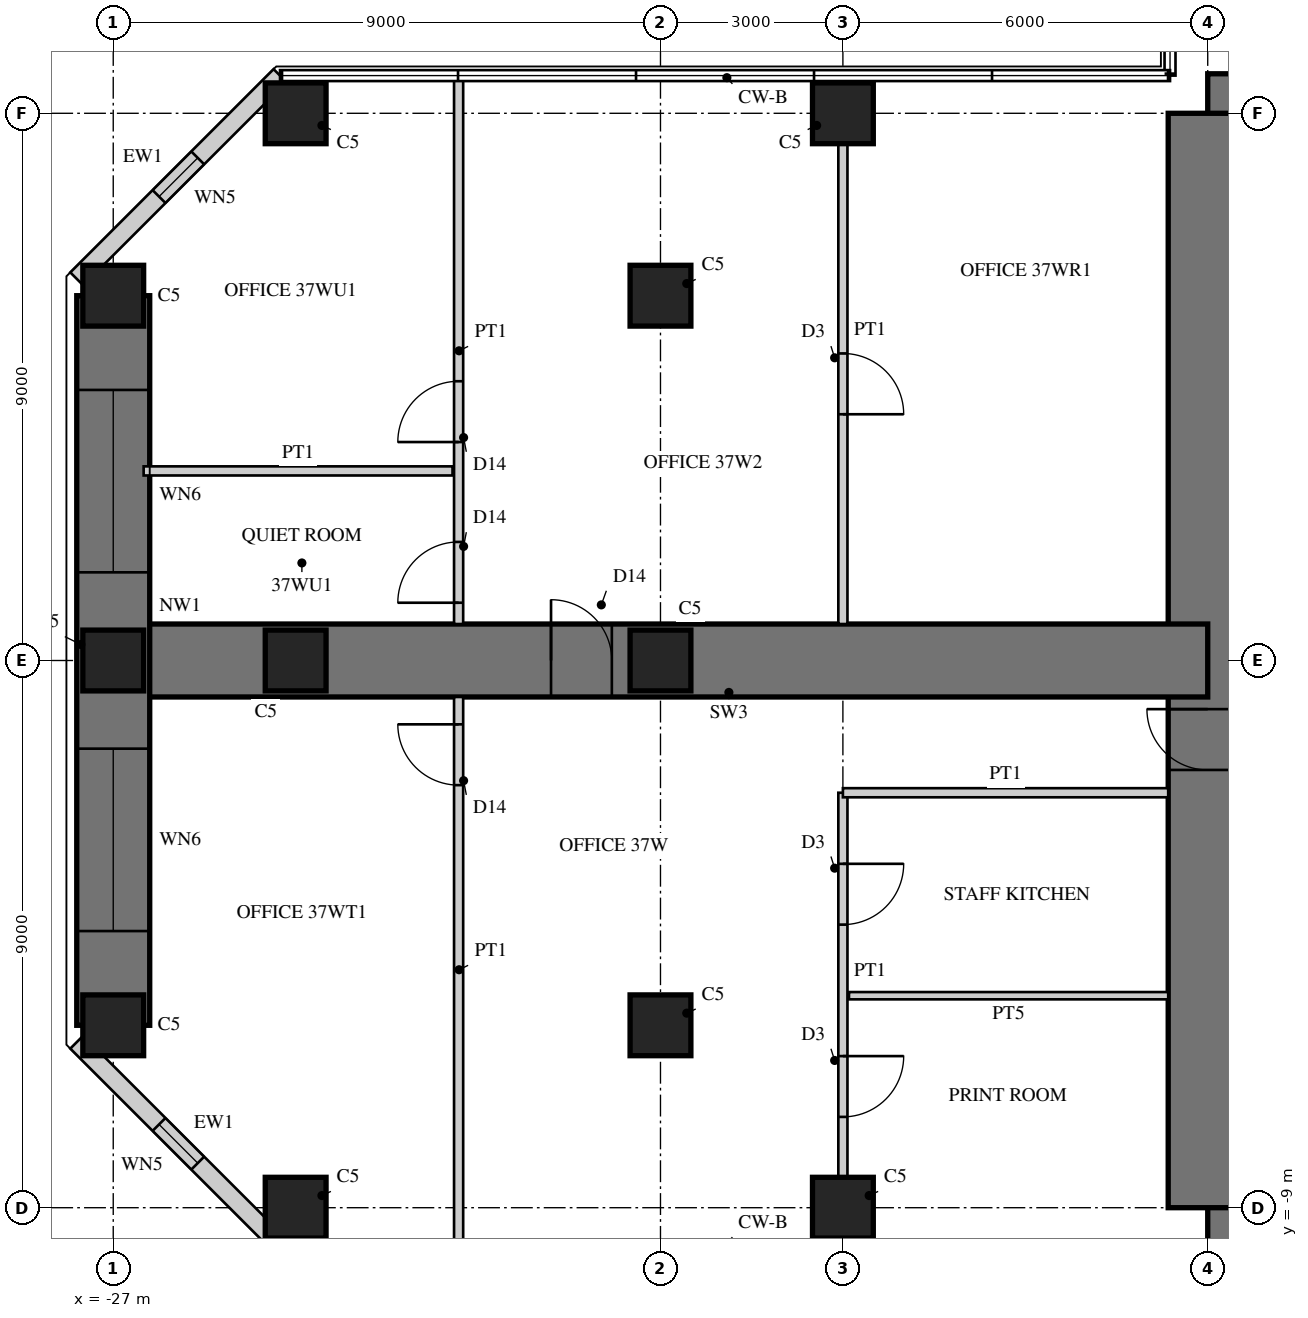
"""IFC4 building model, lengths in metres.
Left out: names, types, materials, properties, quantities, classifications, styles, units other than length and angle.
Written with IfcOpenShell. Run it as: python <this file> out.ifc"""

import sys

from ifc_helpers import new_model, si_unit, direction, frame, frame_2d, origin, origin_2d, place, context, subcontext, project, spatial, rectangle, hollow_rectangle, extrude, element, fill, save


model = new_model("IFC4")
c1 = context("Model", 3, precision=1e-05, world=origin(), true_north=direction((0.0, 1.0)))
c2 = subcontext(c1, "Body", "Model", "MODEL_VIEW")
j1 = project(units=[si_unit("LENGTHUNIT", "METRE"), si_unit("PLANEANGLEUNIT", "RADIAN")], contexts=[c1])
p1 = place(None, origin())
s1 = spatial("IfcSite", under=j1, at=p1, CompositionType="ELEMENT")
p2 = place(p1, origin())
s2 = spatial("IfcBuilding", under=s1, at=p2, CompositionType="ELEMENT")
p3 = place(p2, frame((0.0, 0.0, 152.5)))
s3 = spatial("IfcBuildingStorey", under=s2, at=p3, CompositionType="ELEMENT", Elevation=152.5)
p4 = place(p3, frame((9.0, 9.0, 0.0), z_axis=(0.0, 0.0, 1.0), x_axis=(-1.0, 0.0, 0.0)))
e1 = element("IfcWall", 1, at=p4, inside=s3, PredefinedType="SHEAR", context=c2, shape_type="SweptSolid", body=[
    extrude(rectangle(XDim=18.0, YDim=1.3, at=frame_2d((9.0, 0.0))), origin(), (0.0, 0.0, 1.0), 4.0),
])
p5 = place(p4, frame((9.8, 0.0, 0.0)))
e2 = element("IfcOpeningElement", 2, at=p5, cuts=e1, PredefinedType="OPENING", context=c2, shape_type="SweptSolid", body=[
    extrude(rectangle(XDim=1.0, YDim=2.4, at=frame_2d((0.5, 1.2))), frame((0.0, 0.66, 0.0), z_axis=(0.0, -1.0, 0.0), x_axis=(1.0, 0.0, 0.0)), (0.0, 0.0, 1.0), 1.32),
])
p6 = place(p3, frame((-9.0, -9.0, 0.0), z_axis=(0.0, 0.0, 1.0), x_axis=(1.0, 0.0, 0.0)))
e3 = element("IfcWall", 3, at=p6, inside=s3, PredefinedType="SHEAR", context=c2, shape_type="SweptSolid", body=[
    extrude(rectangle(XDim=18.0, YDim=1.3, at=frame_2d((9.0, 0.0))), origin(), (0.0, 0.0, 1.0), 4.0),
])
p7 = place(p6, frame((9.8, 0.0, 0.0)))
e4 = element("IfcOpeningElement", 4, at=p7, cuts=e3, PredefinedType="OPENING", context=c2, shape_type="SweptSolid", body=[
    extrude(rectangle(XDim=1.0, YDim=2.4, at=frame_2d((0.5, 1.2))), frame((0.0, 0.66, 0.0), z_axis=(0.0, -1.0, 0.0), x_axis=(1.0, 0.0, 0.0)), (0.0, 0.0, 1.0), 1.32),
])
p8 = place(p3, frame((-9.0, 9.0, 0.0), z_axis=(0.0, 0.0, 1.0), x_axis=(0.0, -1.0, 0.0)))
e5 = element("IfcWall", 5, at=p8, inside=s3, PredefinedType="SHEAR", context=c2, shape_type="SweptSolid", body=[
    extrude(rectangle(XDim=18.0, YDim=1.3, at=frame_2d((9.0, 0.0))), origin(), (0.0, 0.0, 1.0), 4.0),
])
p9 = place(p8, frame((9.8, 0.0, 0.0)))
e6 = element("IfcOpeningElement", 6, at=p9, cuts=e5, PredefinedType="OPENING", context=c2, shape_type="SweptSolid", body=[
    extrude(rectangle(XDim=1.0, YDim=2.4, at=frame_2d((0.5, 1.2))), frame((0.0, 0.66, 0.0), z_axis=(0.0, -1.0, 0.0), x_axis=(1.0, 0.0, 0.0)), (0.0, 0.0, 1.0), 1.32),
])
p10 = place(p3, frame((-9.0, 0.0, 0.0), z_axis=(0.0, 0.0, 1.0), x_axis=(-1.0, 0.0, 0.0)))
e7 = element("IfcWall", 7, at=p10, inside=s3, PredefinedType="SHEAR", context=c2, shape_type="SweptSolid", body=[
    extrude(rectangle(XDim=18.0, YDim=1.2, at=frame_2d((9.0, 0.0))), origin(), (0.0, 0.0, 1.0), 4.0),
])
p11 = place(p10, frame((9.8, 0.0, 0.0)))
e8 = element("IfcOpeningElement", 8, at=p11, cuts=e7, PredefinedType="OPENING", context=c2, shape_type="SweptSolid", body=[
    extrude(rectangle(XDim=1.0, YDim=2.2, at=frame_2d((0.5, 1.1))), frame((0.0, 0.61, 0.0), z_axis=(0.0, -1.0, 0.0), x_axis=(1.0, 0.0, 0.0)), (0.0, 0.0, 1.0), 1.22),
])
p12 = place(p3, frame((-27.0, 6.0, 0.0), z_axis=(0.0, 0.0, 1.0), x_axis=(0.0, -1.0, 0.0)))
e9 = element("IfcWall", 9, at=p12, inside=s3, PredefinedType="SHEAR", context=c2, shape_type="SweptSolid", body=[
    extrude(rectangle(XDim=12.0, YDim=1.2, at=frame_2d((6.0, 0.0))), origin(), (0.0, 0.0, 1.0), 4.0),
])
p13 = place(p12, frame((1.55, 0.0, 0.6)))
e10 = element("IfcOpeningElement", 10, at=p13, cuts=e9, PredefinedType="OPENING", context=c2, shape_type="SweptSolid", body=[
    extrude(rectangle(XDim=3.0, YDim=2.4, at=frame_2d((1.5, 1.2))), frame((0.0, 0.61, 0.0), z_axis=(0.0, -1.0, 0.0), x_axis=(1.0, 0.0, 0.0)), (0.0, 0.0, 1.0), 1.22),
])
p14 = place(p12, frame((7.45, 0.0, 0.6)))
e11 = element("IfcOpeningElement", 11, at=p14, cuts=e9, PredefinedType="OPENING", context=c2, shape_type="SweptSolid", body=[
    extrude(rectangle(XDim=3.0, YDim=2.4, at=frame_2d((1.5, 1.2))), frame((0.0, 0.61, 0.0), z_axis=(0.0, -1.0, 0.0), x_axis=(1.0, 0.0, 0.0)), (0.0, 0.0, 1.0), 1.22),
])
for number, where, z_axis, x_axis in (
    (12, (-15.0, 9.0, 0.0), (0.0, 0.0, 1.0), (1.0, 0.0, 0.0)),
    (13, (-24.0, 9.0, 0.0), (0.0, 0.0, 1.0), (1.0, 0.0, 0.0)),
    (14, (-15.0, -9.0, 0.0), (0.0, 0.0, 1.0), (1.0, 0.0, 0.0)),
    (15, (-24.0, -9.0, 0.0), (0.0, 0.0, 1.0), (1.0, 0.0, 0.0)),
    (16, (-27.0, 6.0, 0.0), (0.0, 0.0, 1.0), (1.0, 0.0, 0.0)),
    (17, (-27.0, 0.0, 0.0), (0.0, 0.0, 1.0), (1.0, 0.0, 0.0)),
    (18, (-27.0, -6.0, 0.0), (0.0, 0.0, 1.0), (1.0, 0.0, 0.0)),
    (19, (-18.0, 6.0, 0.0), (0.0, 0.0, 1.0), (1.0, 0.0, 0.0)),
    (20, (-18.0, 0.0, 0.0), (0.0, 0.0, 1.0), (1.0, 0.0, 0.0)),
    (21, (-18.0, -6.0, 0.0), (0.0, 0.0, 1.0), (1.0, 0.0, 0.0)),
    (22, (-24.0, 0.0, 0.0), (0.0, 0.0, 1.0), (1.0, 0.0, 0.0)),
):
    element("IfcColumn", number, at=place(p3, frame(where, z_axis=z_axis, x_axis=x_axis)), inside=s3, PredefinedType="COLUMN", context=c2, shape_type="SweptSolid", body=[
        extrude(rectangle(XDim=1.0, YDim=1.0, at=origin_2d()), origin(), (0.0, 0.0, 1.0), 4.0),
    ])
p15 = place(p3, frame((-24.257, 9.62, 0.0), z_axis=(0.0, 0.0, 1.0), x_axis=(-0.707106781187, -0.707106781187, 0.0)))
e23 = element("IfcWall", 23, at=p15, inside=s3, PredefinedType="SOLIDWALL", context=c2, shape_type="SweptSolid", body=[
    extrude(rectangle(XDim=4.728, YDim=0.3, at=frame_2d((2.364, 0.0))), origin(), (0.0, 0.0, 1.0), 3.8),
])
p16 = place(p15, frame((1.914, 0.0, 0.3)))
e24 = element("IfcOpeningElement", 24, at=p16, cuts=e23, PredefinedType="OPENING", context=c2, shape_type="SweptSolid", body=[
    extrude(rectangle(XDim=0.9, YDim=2.4, at=frame_2d((0.45, 1.2))), frame((0.0, 0.16, 0.0), z_axis=(0.0, -1.0, 0.0), x_axis=(1.0, 0.0, 0.0)), (0.0, 0.0, 1.0), 0.32),
])
p17 = place(p3, frame((-27.6, -6.277, 0.0), z_axis=(0.0, 0.0, 1.0), x_axis=(0.707106781187, -0.707106781187, 0.0)))
e25 = element("IfcWall", 25, at=p17, inside=s3, PredefinedType="SOLIDWALL", context=c2, shape_type="SweptSolid", body=[
    extrude(rectangle(XDim=4.728, YDim=0.3, at=frame_2d((2.364, 0.0))), origin(), (0.0, 0.0, 1.0), 3.8),
])
p18 = place(p17, frame((1.914, 0.0, 0.3)))
e26 = element("IfcOpeningElement", 26, at=p18, cuts=e25, PredefinedType="OPENING", context=c2, shape_type="SweptSolid", body=[
    extrude(rectangle(XDim=0.9, YDim=2.4, at=frame_2d((0.45, 1.2))), frame((0.0, 0.16, 0.0), z_axis=(0.0, -1.0, 0.0), x_axis=(1.0, 0.0, 0.0)), (0.0, 0.0, 1.0), 0.32),
])
p19 = place(p3, frame((-15.0, -2.175, 0.0), z_axis=(0.0, 0.0, 1.0), x_axis=(0.0, -1.0, 0.0)))
e27 = element("IfcWall", 27, at=p19, inside=s3, PredefinedType="PARTITIONING", context=c2, shape_type="SweptSolid", body=[
    extrude(rectangle(XDim=6.325, YDim=0.15, at=frame_2d((3.163, 0.0))), origin(), (0.0, 0.0, 1.0), 3.0),
])
p20 = place(p19, frame((1.169, 0.0, 0.0)))
e28 = element("IfcOpeningElement", 28, at=p20, cuts=e27, PredefinedType="OPENING", context=c2, shape_type="SweptSolid", body=[
    extrude(rectangle(XDim=1.0, YDim=2.1, at=frame_2d((0.5, 1.05))), frame((0.0, 0.085, 0.0), z_axis=(0.0, -1.0, 0.0), x_axis=(1.0, 0.0, 0.0)), (0.0, 0.0, 1.0), 0.17),
])
p21 = place(p19, frame((4.332, 0.0, 0.0)))
e29 = element("IfcOpeningElement", 29, at=p21, cuts=e27, PredefinedType="OPENING", context=c2, shape_type="SweptSolid", body=[
    extrude(rectangle(XDim=1.0, YDim=2.1, at=frame_2d((0.5, 1.05))), frame((0.0, 0.085, 0.0), z_axis=(0.0, -1.0, 0.0), x_axis=(1.0, 0.0, 0.0)), (0.0, 0.0, 1.0), 0.17),
])
p22 = place(p3, frame((-9.65, -2.175, 0.0), z_axis=(0.0, 0.0, 1.0), x_axis=(-1.0, 0.0, 0.0)))
e30 = element("IfcWall", 30, at=p22, inside=s3, PredefinedType="PARTITIONING", context=c2, shape_type="SweptSolid", body=[
    extrude(rectangle(XDim=5.35, YDim=0.15, at=frame_2d((2.675, 0.0))), origin(), (0.0, 0.0, 1.0), 3.8),
])
p23 = place(p3, frame((-9.65, -5.513, 0.0), z_axis=(0.0, 0.0, 1.0), x_axis=(-1.0, 0.0, 0.0)))
e31 = element("IfcWall", 31, at=p23, inside=s3, PredefinedType="PLUMBINGWALL", context=c2, shape_type="SweptSolid", body=[
    extrude(rectangle(XDim=5.25, YDim=0.12, at=frame_2d((2.625, 0.0))), origin(), (0.0, 0.0, 1.0), 3.8),
])
p24 = place(p3, frame((-15.0, 8.5, 0.0), z_axis=(0.0, 0.0, 1.0), x_axis=(0.0, -1.0, 0.0)))
e32 = element("IfcWall", 32, at=p24, inside=s3, PredefinedType="PARTITIONING", context=c2, shape_type="SweptSolid", body=[
    extrude(rectangle(XDim=7.9, YDim=0.15, at=frame_2d((3.95, 0.0))), origin(), (0.0, 0.0, 1.0), 3.0),
])
p25 = place(p24, frame((3.45, 0.0, 0.0)))
e33 = element("IfcOpeningElement", 33, at=p25, cuts=e32, PredefinedType="OPENING", context=c2, shape_type="SweptSolid", body=[
    extrude(rectangle(XDim=1.0, YDim=2.1, at=frame_2d((0.5, 1.05))), frame((0.0, 0.085, 0.0), z_axis=(0.0, -1.0, 0.0), x_axis=(1.0, 0.0, 0.0)), (0.0, 0.0, 1.0), 0.17),
])
p26 = place(p3, frame((-21.32, -0.6, 0.0), z_axis=(0.0, 0.0, 1.0), x_axis=(0.0, -1.0, 0.0)))
e34 = element("IfcWall", 34, at=p26, inside=s3, PredefinedType="PARTITIONING", context=c2, shape_type="SweptSolid", body=[
    extrude(rectangle(XDim=8.98, YDim=0.15, at=frame_2d((4.49, 0.0))), origin(), (0.0, 0.0, 1.0), 3.8),
])
p27 = place(p26, frame((0.45, 0.0, 0.0)))
e35 = element("IfcOpeningElement", 35, at=p27, cuts=e34, PredefinedType="OPENING", context=c2, shape_type="SweptSolid", body=[
    extrude(rectangle(XDim=1.0, YDim=2.2, at=frame_2d((0.5, 1.1))), frame((0.0, 0.085, 0.0), z_axis=(0.0, -1.0, 0.0), x_axis=(1.0, 0.0, 0.0)), (0.0, 0.0, 1.0), 0.17),
])
p28 = place(p3, frame((-21.42, 3.118, 0.0), z_axis=(0.0, 0.0, 1.0), x_axis=(-1.0, 0.0, 0.0)))
e36 = element("IfcWall", 36, at=p28, inside=s3, PredefinedType="PARTITIONING", context=c2, shape_type="SweptSolid", body=[
    extrude(rectangle(XDim=5.08, YDim=0.15, at=frame_2d((2.54, 0.0))), origin(), (0.0, 0.0, 1.0), 3.8),
])
p29 = place(p3, frame((-21.32, 9.58, 0.0), z_axis=(0.0, 0.0, 1.0), x_axis=(0.0, -1.0, 0.0)))
e37 = element("IfcWall", 37, at=p29, inside=s3, PredefinedType="PARTITIONING", context=c2, shape_type="SweptSolid", body=[
    extrude(rectangle(XDim=8.98, YDim=0.15, at=frame_2d((4.49, 0.0))), origin(), (0.0, 0.0, 1.0), 3.8),
])
p30 = place(p29, frame((4.987, 0.0, 0.0)))
e38 = element("IfcOpeningElement", 38, at=p30, cuts=e37, PredefinedType="OPENING", context=c2, shape_type="SweptSolid", body=[
    extrude(rectangle(XDim=1.0, YDim=2.2, at=frame_2d((0.5, 1.1))), frame((0.0, 0.085, 0.0), z_axis=(0.0, -1.0, 0.0), x_axis=(1.0, 0.0, 0.0)), (0.0, 0.0, 1.0), 0.17),
])
p31 = place(p29, frame((7.63, 0.0, 0.0)))
e39 = element("IfcOpeningElement", 39, at=p31, cuts=e37, PredefinedType="OPENING", context=c2, shape_type="SweptSolid", body=[
    extrude(rectangle(XDim=1.0, YDim=2.2, at=frame_2d((0.5, 1.1))), frame((0.0, 0.085, 0.0), z_axis=(0.0, -1.0, 0.0), x_axis=(1.0, 0.0, 0.0)), (0.0, 0.0, 1.0), 0.17),
])
p32 = place(p16, origin())
e40 = element("IfcWindow", 40, at=p32, inside=s3, PartitioningType="SINGLE_PANEL", PredefinedType="WINDOW", context=c2, shape_type="SweptSolid", body=[
    extrude(hollow_rectangle(XDim=0.9, YDim=2.4, WallThickness=0.06, at=frame_2d((0.45, 1.2))), frame((0.0, 0.03, 0.0), z_axis=(0.0, -1.0, 0.0), x_axis=(1.0, 0.0, 0.0)), (0.0, 0.0, 1.0), 0.06),
    extrude(rectangle(XDim=0.779, YDim=2.279, at=frame_2d((0.45, 1.2))), frame((0.0, 0.03, 0.0), z_axis=(0.0, -1.0, 0.0), x_axis=(1.0, 0.0, 0.0)), (0.0, 0.0, 1.0), 0.06),
])
fill(e24, e40)
p33 = place(p13, origin())
e41 = element("IfcWindow", 41, at=p33, inside=s3, PartitioningType="SINGLE_PANEL", PredefinedType="WINDOW", context=c2, shape_type="SweptSolid", body=[
    extrude(hollow_rectangle(XDim=3.0, YDim=2.4, WallThickness=0.06, at=frame_2d((1.5, 1.2))), frame((0.0, 0.03, 0.0), z_axis=(0.0, -1.0, 0.0), x_axis=(1.0, 0.0, 0.0)), (0.0, 0.0, 1.0), 0.06),
    extrude(rectangle(XDim=2.879, YDim=2.279, at=frame_2d((1.5, 1.2))), frame((0.0, 0.03, 0.0), z_axis=(0.0, -1.0, 0.0), x_axis=(1.0, 0.0, 0.0)), (0.0, 0.0, 1.0), 0.06),
])
fill(e10, e41)
p34 = place(p14, origin())
e42 = element("IfcWindow", 42, at=p34, inside=s3, PartitioningType="SINGLE_PANEL", PredefinedType="WINDOW", context=c2, shape_type="SweptSolid", body=[
    extrude(hollow_rectangle(XDim=3.0, YDim=2.4, WallThickness=0.06, at=frame_2d((1.5, 1.2))), frame((0.0, 0.03, 0.0), z_axis=(0.0, -1.0, 0.0), x_axis=(1.0, 0.0, 0.0)), (0.0, 0.0, 1.0), 0.06),
    extrude(rectangle(XDim=2.879, YDim=2.279, at=frame_2d((1.5, 1.2))), frame((0.0, 0.03, 0.0), z_axis=(0.0, -1.0, 0.0), x_axis=(1.0, 0.0, 0.0)), (0.0, 0.0, 1.0), 0.06),
])
fill(e11, e42)
p35 = place(p18, origin())
e43 = element("IfcWindow", 43, at=p35, inside=s3, PartitioningType="SINGLE_PANEL", PredefinedType="WINDOW", context=c2, shape_type="SweptSolid", body=[
    extrude(hollow_rectangle(XDim=0.9, YDim=2.4, WallThickness=0.06, at=frame_2d((0.45, 1.2))), frame((0.0, 0.03, 0.0), z_axis=(0.0, -1.0, 0.0), x_axis=(1.0, 0.0, 0.0)), (0.0, 0.0, 1.0), 0.06),
    extrude(rectangle(XDim=0.779, YDim=2.279, at=frame_2d((0.45, 1.2))), frame((0.0, 0.03, 0.0), z_axis=(0.0, -1.0, 0.0), x_axis=(1.0, 0.0, 0.0)), (0.0, 0.0, 1.0), 0.06),
])
fill(e26, e43)
p36 = place(p20, origin())
e44 = element("IfcDoor", 44, at=p36, inside=s3, OperationType="SINGLE_SWING_LEFT", PredefinedType="DOOR", context=c2, shape_type="SweptSolid", body=[
    extrude(rectangle(XDim=1.0, YDim=2.1, at=frame_2d((0.5, 1.05))), frame((0.0, 0.025, 0.0), z_axis=(0.0, -1.0, 0.0), x_axis=(1.0, 0.0, 0.0)), (0.0, 0.0, 1.0), 0.05),
])
fill(e28, e44)
p37 = place(p21, origin())
e45 = element("IfcDoor", 45, at=p37, inside=s3, OperationType="SINGLE_SWING_LEFT", PredefinedType="DOOR", context=c2, shape_type="SweptSolid", body=[
    extrude(rectangle(XDim=1.0, YDim=2.1, at=frame_2d((0.5, 1.05))), frame((0.0, 0.025, 0.0), z_axis=(0.0, -1.0, 0.0), x_axis=(1.0, 0.0, 0.0)), (0.0, 0.0, 1.0), 0.05),
])
fill(e29, e45)
p38 = place(p25, origin())
e46 = element("IfcDoor", 46, at=p38, inside=s3, OperationType="SINGLE_SWING_RIGHT", PredefinedType="DOOR", context=c2, shape_type="SweptSolid", body=[
    extrude(rectangle(XDim=1.0, YDim=2.1, at=frame_2d((0.5, 1.05))), frame((0.0, 0.025, 0.0), z_axis=(0.0, -1.0, 0.0), x_axis=(1.0, 0.0, 0.0)), (0.0, 0.0, 1.0), 0.05),
])
fill(e33, e46)
p39 = place(p27, frame((1.0, 0.0, 0.0), z_axis=(0.0, 0.0, 1.0), x_axis=(-1.0, 0.0, 0.0)))
e47 = element("IfcDoor", 47, at=p39, inside=s3, OperationType="SINGLE_SWING_RIGHT", PredefinedType="DOOR", context=c2, shape_type="SweptSolid", body=[
    extrude(rectangle(XDim=1.0, YDim=2.2, at=frame_2d((0.5, 1.1))), frame((0.0, 0.025, 0.0), z_axis=(0.0, -1.0, 0.0), x_axis=(1.0, 0.0, 0.0)), (0.0, 0.0, 1.0), 0.05),
])
fill(e35, e47)
p40 = place(p30, frame((1.0, 0.0, 0.0), z_axis=(0.0, 0.0, 1.0), x_axis=(-1.0, 0.0, 0.0)))
e48 = element("IfcDoor", 48, at=p40, inside=s3, OperationType="SINGLE_SWING_LEFT", PredefinedType="DOOR", context=c2, shape_type="SweptSolid", body=[
    extrude(rectangle(XDim=1.0, YDim=2.2, at=frame_2d((0.5, 1.1))), frame((0.0, 0.025, 0.0), z_axis=(0.0, -1.0, 0.0), x_axis=(1.0, 0.0, 0.0)), (0.0, 0.0, 1.0), 0.05),
])
fill(e38, e48)
p41 = place(p31, frame((1.0, 0.0, 0.0), z_axis=(0.0, 0.0, 1.0), x_axis=(-1.0, 0.0, 0.0)))
e49 = element("IfcDoor", 49, at=p41, inside=s3, OperationType="SINGLE_SWING_LEFT", PredefinedType="DOOR", context=c2, shape_type="SweptSolid", body=[
    extrude(rectangle(XDim=1.0, YDim=2.2, at=frame_2d((0.5, 1.1))), frame((0.0, 0.025, 0.0), z_axis=(0.0, -1.0, 0.0), x_axis=(1.0, 0.0, 0.0)), (0.0, 0.0, 1.0), 0.05),
])
fill(e39, e49)
p42 = place(p11, frame((1.0, 0.0, 0.0), z_axis=(0.0, 0.0, 1.0), x_axis=(-1.0, 0.0, 0.0)))
e50 = element("IfcDoor", 50, at=p42, inside=s3, OperationType="SINGLE_SWING_LEFT", PredefinedType="DOOR", context=c2, shape_type="SweptSolid", body=[
    extrude(rectangle(XDim=1.0, YDim=2.2, at=frame_2d((0.5, 1.1))), frame((0.0, 0.025, 0.0), z_axis=(0.0, -1.0, 0.0), x_axis=(1.0, 0.0, 0.0)), (0.0, 0.0, 1.0), 0.05),
])
fill(e8, e50)
p43 = place(p9, frame((1.0, 0.0, 0.0), z_axis=(0.0, 0.0, 1.0), x_axis=(-1.0, 0.0, 0.0)))
e51 = element("IfcDoor", 51, at=p43, inside=s3, OperationType="SINGLE_SWING_RIGHT", PredefinedType="DOOR", context=c2, shape_type="SweptSolid", body=[
    extrude(rectangle(XDim=1.0, YDim=2.4, at=frame_2d((0.5, 1.2))), frame((0.0, -0.005, 0.0), z_axis=(0.0, -1.0, 0.0), x_axis=(1.0, 0.0, 0.0)), (0.0, 0.0, 1.0), 0.05),
])
fill(e6, e51)
save(model, sys.argv[1])
